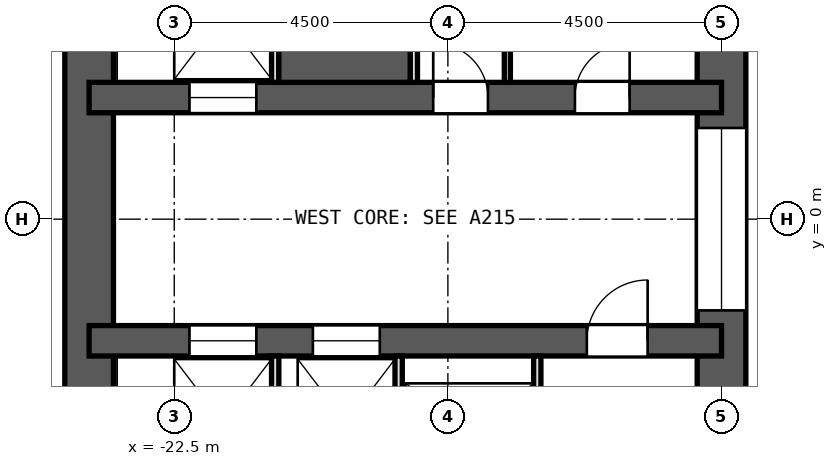
"""IFC4 building model, lengths in metres.
Left out: names, types, materials, properties, quantities, classifications, styles, units other than length and angle.
Written with IfcOpenShell. Run it as: python <this file> out.ifc"""

import sys

from ifc_helpers import new_model, si_unit, direction, frame, frame_2d, origin, place, context, subcontext, project, spatial, rectangle, extrude, element, fill, save


model = new_model("IFC4")
c1 = context("Model", 3, precision=1e-05, world=origin(), true_north=direction((0.0, 1.0)))
c2 = subcontext(c1, "Body", "Model", "MODEL_VIEW")
j1 = project(units=[si_unit("LENGTHUNIT", "METRE"), si_unit("PLANEANGLEUNIT", "RADIAN")], contexts=[c1])
p1 = place(None, origin())
s1 = spatial("IfcSite", under=j1, at=p1, CompositionType="ELEMENT")
p2 = place(p1, origin())
s2 = spatial("IfcBuilding", under=s1, at=p2, CompositionType="ELEMENT")
p3 = place(p2, frame((0.0, 0.0, 82.4)))
s3 = spatial("IfcBuildingStorey", under=s2, at=p3, CompositionType="ELEMENT", Elevation=82.4)
p4 = place(p3, frame((-13.5, -9.0, 0.0), z_axis=(0.0, 0.0, 1.0), x_axis=(0.0, 1.0, 0.0)))
e1 = element("IfcWall", 1, at=p4, inside=s3, PredefinedType="SHEAR", context=c2, shape_type="SweptSolid", body=[
    extrude(rectangle(XDim=18.0, YDim=0.8, at=frame_2d((9.0, 0.0))), origin(), (0.0, 0.0, 1.0), 4.5),
])
p5 = place(p4, frame((15.4, 0.0, 0.0)))
e2 = element("IfcOpeningElement", 2, at=p5, cuts=e1, PredefinedType="OPENING", context=c2, shape_type="SweptSolid", body=[
    extrude(rectangle(XDim=1.2, YDim=2.1, at=frame_2d((0.6, 1.05))), frame((0.0, 0.412, 0.0), z_axis=(0.0, -1.0, 0.0), x_axis=(1.0, 0.0, 0.0)), (0.0, 0.0, 1.0), 0.824),
])
p6 = place(p4, frame((1.4, 0.0, 0.0)))
e3 = element("IfcOpeningElement", 3, at=p6, cuts=e1, PredefinedType="OPENING", context=c2, shape_type="SweptSolid", body=[
    extrude(rectangle(XDim=1.2, YDim=2.1, at=frame_2d((0.6, 1.05))), frame((0.0, 0.412, 0.0), z_axis=(0.0, -1.0, 0.0), x_axis=(1.0, 0.0, 0.0)), (0.0, 0.0, 1.0), 0.824),
])
p7 = place(p4, frame((7.5, 0.0, 0.0)))
e4 = element("IfcOpeningElement", 4, at=p7, cuts=e1, PredefinedType="OPENING", context=c2, shape_type="SweptSolid", body=[
    extrude(rectangle(XDim=3.0, YDim=2.4, at=frame_2d((1.5, 1.2))), frame((0.0, 0.412, 0.0), z_axis=(0.0, -1.0, 0.0), x_axis=(1.0, 0.0, 0.0)), (0.0, 0.0, 1.0), 0.824),
])
p8 = place(p3, frame((-23.9, -9.0, 0.0), z_axis=(0.0, 0.0, 1.0), x_axis=(0.0, 1.0, 0.0)))
e5 = element("IfcWall", 5, at=p8, inside=s3, PredefinedType="SHEAR", context=c2, shape_type="SweptSolid", body=[
    extrude(rectangle(XDim=18.0, YDim=0.8, at=frame_2d((9.0, 0.0))), origin(), (0.0, 0.0, 1.0), 4.5),
])
p9 = place(p3, frame((-13.5, 2.0, 0.0), z_axis=(0.0, 0.0, 1.0), x_axis=(-1.0, 0.0, 0.0)))
e6 = element("IfcWall", 6, at=p9, inside=s3, PredefinedType="SHEAR", context=c2, shape_type="SweptSolid", body=[
    extrude(rectangle(XDim=10.4, YDim=0.5, at=frame_2d((5.2, 0.0))), origin(), (0.0, 0.0, 1.0), 4.5),
])
p10 = place(p9, frame((7.65, 0.0, 0.0)))
e7 = element("IfcOpeningElement", 7, at=p10, cuts=e6, PredefinedType="OPENING", context=c2, shape_type="SweptSolid", body=[
    extrude(rectangle(XDim=1.1, YDim=2.1, at=frame_2d((0.55, 1.05))), frame((0.0, 0.262, 0.0), z_axis=(0.0, -1.0, 0.0), x_axis=(1.0, 0.0, 0.0)), (0.0, 0.0, 1.0), 0.524),
])
p11 = place(p9, frame((1.511, 0.0, 0.0)))
e8 = element("IfcOpeningElement", 8, at=p11, cuts=e6, PredefinedType="OPENING", context=c2, shape_type="SweptSolid", body=[
    extrude(rectangle(XDim=0.9, YDim=2.1, at=frame_2d((0.45, 1.05))), frame((0.0, 0.262, 0.0), z_axis=(0.0, -1.0, 0.0), x_axis=(1.0, 0.0, 0.0)), (0.0, 0.0, 1.0), 0.524),
])
p12 = place(p9, frame((3.841, 0.0, 0.0)))
e9 = element("IfcOpeningElement", 9, at=p12, cuts=e6, PredefinedType="OPENING", context=c2, shape_type="SweptSolid", body=[
    extrude(rectangle(XDim=0.9, YDim=2.1, at=frame_2d((0.45, 1.05))), frame((0.0, 0.262, 0.0), z_axis=(0.0, -1.0, 0.0), x_axis=(1.0, 0.0, 0.0)), (0.0, 0.0, 1.0), 0.524),
])
p13 = place(p3, frame((-13.5, -2.0, 0.0), z_axis=(0.0, 0.0, 1.0), x_axis=(-1.0, 0.0, 0.0)))
e10 = element("IfcWall", 10, at=p13, inside=s3, PredefinedType="SHEAR", context=c2, shape_type="SweptSolid", body=[
    extrude(rectangle(XDim=10.4, YDim=0.5, at=frame_2d((5.2, 0.0))), origin(), (0.0, 0.0, 1.0), 4.5),
])
p14 = place(p13, frame((5.62, 0.0, 0.0)))
e11 = element("IfcOpeningElement", 11, at=p14, cuts=e10, PredefinedType="OPENING", context=c2, shape_type="SweptSolid", body=[
    extrude(rectangle(XDim=1.1, YDim=2.1, at=frame_2d((0.55, 1.05))), frame((0.0, 0.262, 0.0), z_axis=(0.0, -1.0, 0.0), x_axis=(1.0, 0.0, 0.0)), (0.0, 0.0, 1.0), 0.524),
])
p15 = place(p13, frame((7.65, 0.0, 0.0)))
e12 = element("IfcOpeningElement", 12, at=p15, cuts=e10, PredefinedType="OPENING", context=c2, shape_type="SweptSolid", body=[
    extrude(rectangle(XDim=1.1, YDim=2.1, at=frame_2d((0.55, 1.05))), frame((0.0, 0.262, 0.0), z_axis=(0.0, -1.0, 0.0), x_axis=(1.0, 0.0, 0.0)), (0.0, 0.0, 1.0), 0.524),
])
p16 = place(p13, frame((1.215, 0.0, 0.0)))
e13 = element("IfcOpeningElement", 13, at=p16, cuts=e10, PredefinedType="OPENING", context=c2, shape_type="SweptSolid", body=[
    extrude(rectangle(XDim=1.0, YDim=2.1, at=frame_2d((0.5, 1.05))), frame((0.0, 0.262, 0.0), z_axis=(0.0, -1.0, 0.0), x_axis=(1.0, 0.0, 0.0)), (0.0, 0.0, 1.0), 0.524),
])
p17 = place(p3, frame((-17.022, 2.25, 0.0), z_axis=(0.0, 0.0, 1.0), x_axis=(0.0, 1.0, 0.0)))
e14 = element("IfcWall", 14, at=p17, inside=s3, PredefinedType="PARTITIONING", context=c2, shape_type="SweptSolid", body=[
    extrude(rectangle(XDim=2.5, YDim=0.1, at=frame_2d((1.25, 0.0))), origin(), (0.0, 0.0, 1.0), 3.95),
])
for number, where, z_axis, x_axis in (
    (15, (-18.56, 2.25, 0.0), (0.0, 0.0, 1.0), (0.0, 1.0, 0.0)),
    (16, (-20.84, 2.25, 0.0), (0.0, 0.0, 1.0), (0.0, 1.0, 0.0)),
):
    element("IfcWall", number, at=place(p3, frame(where, z_axis=z_axis, x_axis=x_axis)), inside=s3, PredefinedType="PARTITIONING", context=c2, shape_type="SweptSolid", body=[
        extrude(rectangle(XDim=2.5, YDim=0.12, at=frame_2d((1.25, 0.0))), origin(), (0.0, 0.0, 1.0), 3.95),
    ])
p18 = place(p3, frame((-16.53, -4.75, 0.0), z_axis=(0.0, 0.0, 1.0), x_axis=(0.0, 1.0, 0.0)))
e17 = element("IfcWall", 17, at=p18, inside=s3, PredefinedType="PARTITIONING", context=c2, shape_type="SweptSolid", body=[
    extrude(rectangle(XDim=2.5, YDim=0.12, at=frame_2d((1.25, 0.0))), origin(), (0.0, 0.0, 1.0), 3.95),
])
p19 = place(p18, frame((0.7, 0.0, 0.0)))
e18 = element("IfcOpeningElement", 18, at=p19, cuts=e17, PredefinedType="OPENING", context=c2, shape_type="SweptSolid", body=[
    extrude(rectangle(XDim=1.1, YDim=2.1, at=frame_2d((0.55, 1.05))), frame((0.0, 0.072, 0.0), z_axis=(0.0, -1.0, 0.0), x_axis=(1.0, 0.0, 0.0)), (0.0, 0.0, 1.0), 0.144),
])
for number, where, z_axis, x_axis in (
    (19, (-18.81, -4.75, 0.0), (0.0, 0.0, 1.0), (0.0, 1.0, 0.0)),
    (20, (-20.84, -4.75, 0.0), (0.0, 0.0, 1.0), (0.0, 1.0, 0.0)),
):
    element("IfcWall", number, at=place(p3, frame(where, z_axis=z_axis, x_axis=x_axis)), inside=s3, PredefinedType="PARTITIONING", context=c2, shape_type="SweptSolid", body=[
        extrude(rectangle(XDim=2.5, YDim=0.12, at=frame_2d((1.25, 0.0))), origin(), (0.0, 0.0, 1.0), 3.95),
    ])
p20 = place(p3, frame((-18.62, 3.5, 0.0), z_axis=(0.0, 0.0, 1.0), x_axis=(-1.0, 0.0, 0.0)))
e21 = element("IfcWall", 21, at=p20, inside=s3, PredefinedType="SOLIDWALL", context=c2, shape_type="SweptSolid", body=[
    extrude(rectangle(XDim=2.16, YDim=2.5, at=frame_2d((1.08, 0.0))), origin(), (0.0, 0.0, 1.0), 3.1),
])
p21 = place(p10, origin())
e22 = element("IfcDoor", 22, at=p21, inside=s3, OperationType="DOUBLE_DOOR_SLIDING", PredefinedType="DOOR", context=c2, shape_type="SweptSolid", body=[
    extrude(rectangle(XDim=1.1, YDim=2.1, at=frame_2d((0.55, 1.05))), frame((0.0, 0.025, 0.0), z_axis=(0.0, -1.0, 0.0), x_axis=(1.0, 0.0, 0.0)), (0.0, 0.0, 1.0), 0.05),
])
fill(e7, e22)
p22 = place(p14, origin())
e23 = element("IfcDoor", 23, at=p22, inside=s3, OperationType="DOUBLE_DOOR_SLIDING", PredefinedType="DOOR", context=c2, shape_type="SweptSolid", body=[
    extrude(rectangle(XDim=1.1, YDim=2.1, at=frame_2d((0.55, 1.05))), frame((0.0, 0.025, 0.0), z_axis=(0.0, -1.0, 0.0), x_axis=(1.0, 0.0, 0.0)), (0.0, 0.0, 1.0), 0.05),
])
fill(e11, e23)
p23 = place(p15, origin())
e24 = element("IfcDoor", 24, at=p23, inside=s3, OperationType="DOUBLE_DOOR_SLIDING", PredefinedType="DOOR", context=c2, shape_type="SweptSolid", body=[
    extrude(rectangle(XDim=1.1, YDim=2.1, at=frame_2d((0.55, 1.05))), frame((0.0, 0.025, 0.0), z_axis=(0.0, -1.0, 0.0), x_axis=(1.0, 0.0, 0.0)), (0.0, 0.0, 1.0), 0.05),
])
fill(e12, e24)
p24 = place(p11, frame((0.9, 0.0, 0.0), z_axis=(0.0, 0.0, 1.0), x_axis=(-1.0, 0.0, 0.0)))
e25 = element("IfcDoor", 25, at=p24, inside=s3, OperationType="SINGLE_SWING_RIGHT", PredefinedType="DOOR", context=c2, shape_type="SweptSolid", body=[
    extrude(rectangle(XDim=0.9, YDim=2.1, at=frame_2d((0.45, 1.05))), frame((0.0, 0.025, 0.0), z_axis=(0.0, -1.0, 0.0), x_axis=(1.0, 0.0, 0.0)), (0.0, 0.0, 1.0), 0.05),
])
fill(e8, e25)
p25 = place(p12, frame((0.9, 0.0, 0.0), z_axis=(0.0, 0.0, 1.0), x_axis=(-1.0, 0.0, 0.0)))
e26 = element("IfcDoor", 26, at=p25, inside=s3, OperationType="SINGLE_SWING_LEFT", PredefinedType="DOOR", context=c2, shape_type="SweptSolid", body=[
    extrude(rectangle(XDim=0.9, YDim=2.1, at=frame_2d((0.45, 1.05))), frame((0.0, 0.025, 0.0), z_axis=(0.0, -1.0, 0.0), x_axis=(1.0, 0.0, 0.0)), (0.0, 0.0, 1.0), 0.05),
])
fill(e9, e26)
p26 = place(p16, frame((1.0, 0.0, 0.0), z_axis=(0.0, 0.0, 1.0), x_axis=(-1.0, 0.0, 0.0)))
e27 = element("IfcDoor", 27, at=p26, inside=s3, OperationType="SINGLE_SWING_RIGHT", PredefinedType="DOOR", context=c2, shape_type="SweptSolid", body=[
    extrude(rectangle(XDim=1.0, YDim=2.1, at=frame_2d((0.5, 1.05))), frame((0.0, 0.025, 0.0), z_axis=(0.0, -1.0, 0.0), x_axis=(1.0, 0.0, 0.0)), (0.0, 0.0, 1.0), 0.05),
])
fill(e13, e27)
p27 = place(p7, origin())
e28 = element("IfcDoor", 28, at=p27, inside=s3, OperationType="DOUBLE_DOOR_SLIDING", PredefinedType="DOOR", context=c2, shape_type="SweptSolid", body=[
    extrude(rectangle(XDim=3.0, YDim=2.4, at=frame_2d((1.5, 1.2))), frame((0.0, 0.025, 0.0), z_axis=(0.0, -1.0, 0.0), x_axis=(1.0, 0.0, 0.0)), (0.0, 0.0, 1.0), 0.05),
])
fill(e4, e28)
save(model, sys.argv[1])
